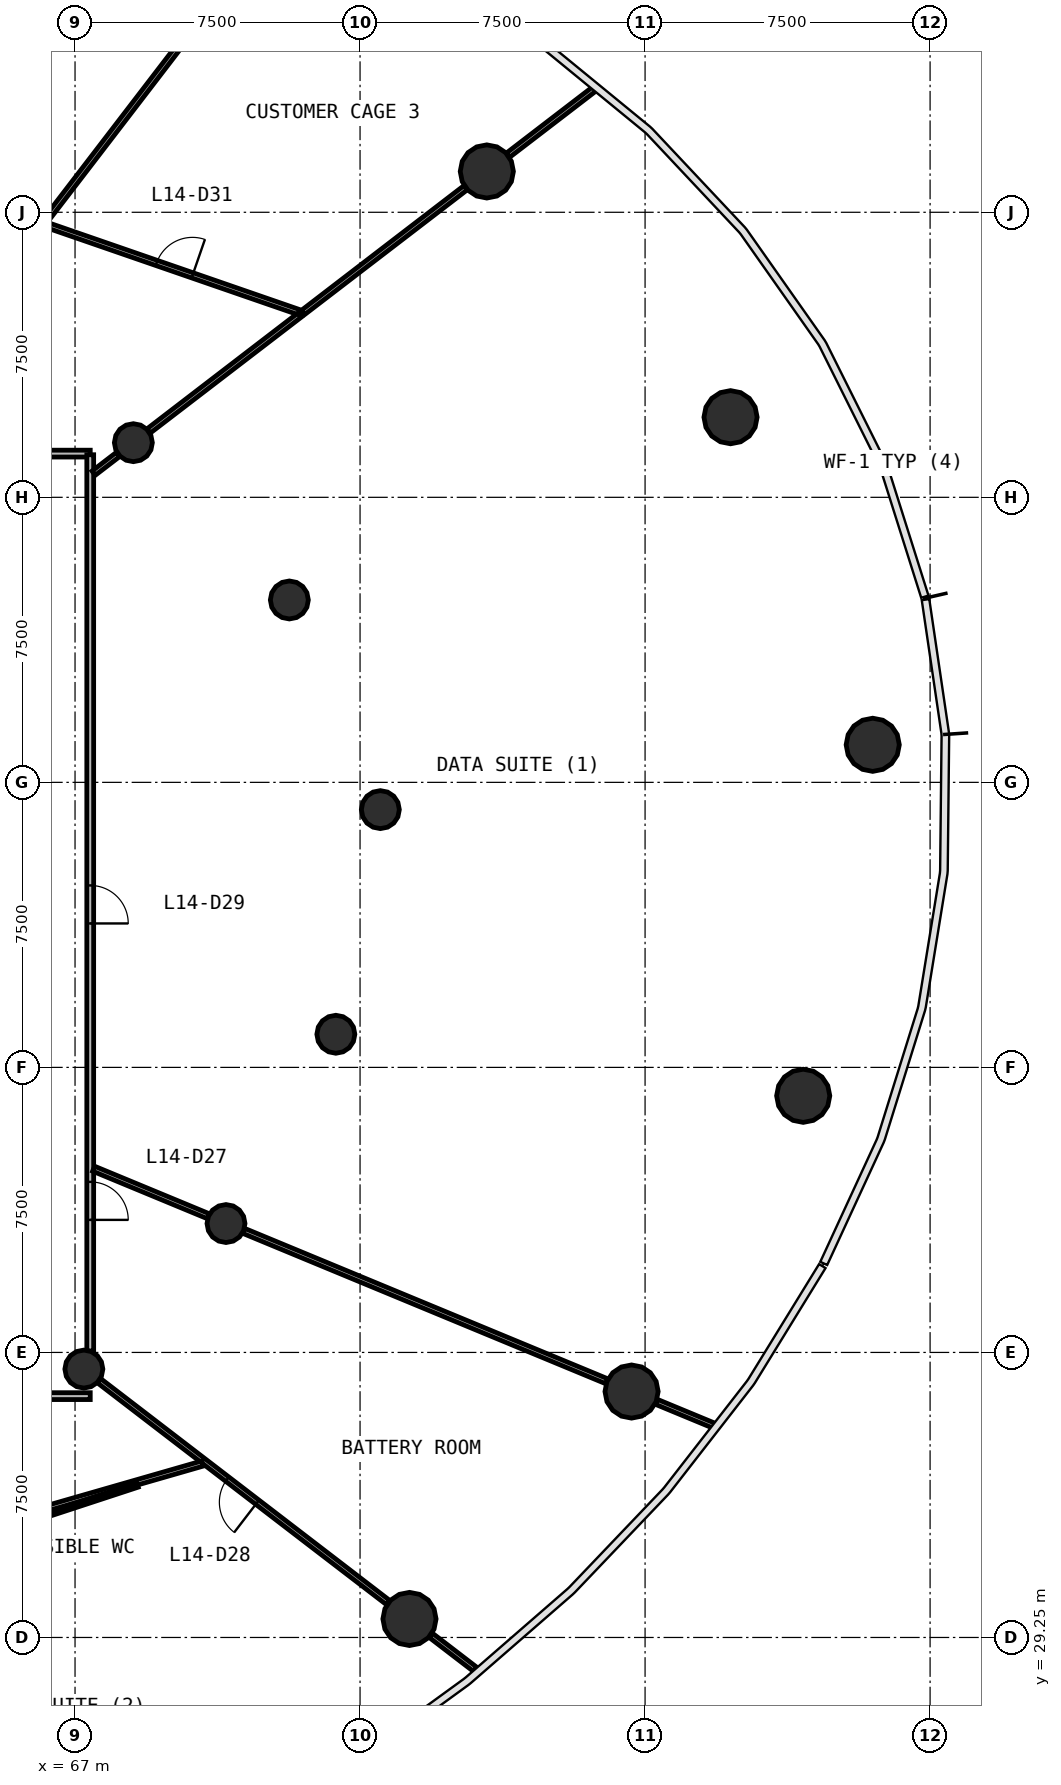
"""IFC4 building model, lengths in metres.
Left out: names, types, materials, properties, quantities, classifications, styles, units other than length and angle.
Written with IfcOpenShell. Run it as: python <this file> out.ifc"""

import sys

from ifc_helpers import new_model, si_unit, direction, frame, frame_2d, origin, origin_2d, place, context, subcontext, project, spatial, rectangle, circle, extrude, source, transform, mapped, element, fill, save


model = new_model("IFC4")
c1 = context("Model", 3, precision=1e-05, world=origin(), true_north=direction((0.0, 1.0)))
c2 = subcontext(c1, "Body", "Model", "MODEL_VIEW")
j1 = project(units=[si_unit("LENGTHUNIT", "METRE"), si_unit("PLANEANGLEUNIT", "RADIAN")], contexts=[c1])
p1 = place(None, origin())
s1 = spatial("IfcSite", under=j1, at=p1, CompositionType="ELEMENT")
p2 = place(p1, origin())
s2 = spatial("IfcBuilding", under=s1, at=p2, CompositionType="ELEMENT")
p3 = place(p2, frame((0.0, 0.0, 62.2)))
s3 = spatial("IfcBuildingStorey", under=s2, at=p3, CompositionType="ELEMENT", Elevation=62.2)
m1 = source(origin(), c2, "Body", "SweptSolid", [
    extrude(circle(Radius=0.7, at=origin_2d()), origin(), (0.0, 0.0, 1.0), 4.4),
])
for number, where, z_axis, x_axis in (
    (1, (87.99, 52.738, 0.0), (0.0, 0.0, 1.0), (1.0, 0.0, 0.0)),
    (2, (84.249, 61.358, 0.0), (0.0, 0.0, 1.0), (1.0, 0.0, 0.0)),
    (3, (77.836, 67.824, 0.0), (0.0, 0.0, 1.0), (1.0, 0.0, 0.0)),
    (4, (75.801, 29.737, 0.0), (0.0, 0.0, 1.0), (1.0, 0.0, 0.0)),
    (5, (81.645, 35.721, 0.0), (0.0, 0.0, 1.0), (1.0, 0.0, 0.0)),
    (6, (86.161, 43.503, 0.0), (0.0, 0.0, 1.0), (1.0, 0.0, 0.0)),
):
    element("IfcColumn", number, at=place(p3, frame(where, z_axis=z_axis, x_axis=x_axis)), inside=s3, PredefinedType="COLUMN", context=c2, shape_type="MappedRepresentation", body=[
        mapped(m1, transform((0.0, 0.0, 0.0), scale=1.0)),
    ])
m2 = source(origin(), c2, "Body", "SweptSolid", [
    extrude(circle(Radius=0.5, at=origin_2d()), origin(), (0.0, 0.0, 1.0), 4.4),
])
for number, where, z_axis, x_axis in (
    (7, (75.034, 51.032, 0.0), (0.0, 0.0, 1.0), (1.0, 0.0, 0.0)),
    (8, (72.639, 56.549, 0.0), (0.0, 0.0, 1.0), (1.0, 0.0, 0.0)),
    (9, (68.535, 60.688, 0.0), (0.0, 0.0, 1.0), (1.0, 0.0, 0.0)),
    (10, (67.232, 36.312, 0.0), (0.0, 0.0, 1.0), (1.0, 0.0, 0.0)),
    (11, (70.972, 40.141, 0.0), (0.0, 0.0, 1.0), (1.0, 0.0, 0.0)),
    (12, (73.863, 45.122, 0.0), (0.0, 0.0, 1.0), (1.0, 0.0, 0.0)),
):
    element("IfcColumn", number, at=place(p3, frame(where, z_axis=z_axis, x_axis=x_axis)), inside=s3, PredefinedType="COLUMN", context=c2, shape_type="MappedRepresentation", body=[
        mapped(m2, transform((0.0, 0.0, 0.0), scale=1.0)),
    ])
p4 = place(p3, frame((67.4, 35.6, 0.0), z_axis=(0.0, 0.0, 1.0), x_axis=(-1.0, 0.0, 0.0)))
e13 = element("IfcWall", 13, at=p4, inside=s3, PredefinedType="PARTITIONING", context=c2, shape_type="SweptSolid", body=[
    extrude(rectangle(XDim=30.8, YDim=0.18, at=frame_2d((15.4, 0.0))), origin(), (0.0, 0.0, 1.0), 3.05),
])
p5 = place(p4, frame((9.05, 0.0, 0.0)))
e14 = element("IfcOpeningElement", 14, at=p5, cuts=e13, PredefinedType="OPENING", context=c2, shape_type="SweptSolid", body=[
    extrude(rectangle(XDim=0.9, YDim=2.1, at=frame_2d((0.45, 1.05))), frame((0.0, 0.1, 0.0), z_axis=(0.0, -1.0, 0.0), x_axis=(1.0, 0.0, 0.0)), (0.0, 0.0, 1.0), 0.2),
])
p6 = place(p4, frame((6.05, 0.0, 0.0)))
e15 = element("IfcOpeningElement", 15, at=p6, cuts=e13, PredefinedType="OPENING", context=c2, shape_type="SweptSolid", body=[
    extrude(rectangle(XDim=0.9, YDim=2.1, at=frame_2d((0.45, 1.05))), frame((0.0, 0.1, 0.0), z_axis=(0.0, -1.0, 0.0), x_axis=(1.0, 0.0, 0.0)), (0.0, 0.0, 1.0), 0.2),
])
p7 = place(p4, frame((2.45, 0.0, 0.0)))
e16 = element("IfcOpeningElement", 16, at=p7, cuts=e13, PredefinedType="OPENING", context=c2, shape_type="SweptSolid", body=[
    extrude(rectangle(XDim=0.9, YDim=2.1, at=frame_2d((0.45, 1.05))), frame((0.0, 0.1, 0.0), z_axis=(0.0, -1.0, 0.0), x_axis=(1.0, 0.0, 0.0)), (0.0, 0.0, 1.0), 0.2),
])
p8 = place(p4, frame((20.95, 0.0, 0.0)))
e17 = element("IfcOpeningElement", 17, at=p8, cuts=e13, PredefinedType="OPENING", context=c2, shape_type="SweptSolid", body=[
    extrude(rectangle(XDim=1.0, YDim=2.1, at=frame_2d((0.5, 1.05))), frame((0.0, 0.1, 0.0), z_axis=(0.0, -1.0, 0.0), x_axis=(1.0, 0.0, 0.0)), (0.0, 0.0, 1.0), 0.2),
])
p9 = place(p4, frame((14.95, 0.0, 0.0)))
e18 = element("IfcOpeningElement", 18, at=p9, cuts=e13, PredefinedType="OPENING", context=c2, shape_type="SweptSolid", body=[
    extrude(rectangle(XDim=1.0, YDim=2.1, at=frame_2d((0.5, 1.05))), frame((0.0, 0.1, 0.0), z_axis=(0.0, -1.0, 0.0), x_axis=(1.0, 0.0, 0.0)), (0.0, 0.0, 1.0), 0.2),
])
p10 = place(p4, frame((12.55, 0.0, 0.0)))
e19 = element("IfcOpeningElement", 19, at=p10, cuts=e13, PredefinedType="OPENING", context=c2, shape_type="SweptSolid", body=[
    extrude(rectangle(XDim=1.0, YDim=2.1, at=frame_2d((0.5, 1.05))), frame((0.0, 0.1, 0.0), z_axis=(0.0, -1.0, 0.0), x_axis=(1.0, 0.0, 0.0)), (0.0, 0.0, 1.0), 0.2),
])
p11 = place(p3, frame((36.6, 60.4, 0.0), z_axis=(0.0, 0.0, 1.0), x_axis=(1.0, 0.0, 0.0)))
e20 = element("IfcWall", 20, at=p11, inside=s3, PredefinedType="PARTITIONING", context=c2, shape_type="SweptSolid", body=[
    extrude(rectangle(XDim=30.8, YDim=0.18, at=frame_2d((15.4, 0.0))), origin(), (0.0, 0.0, 1.0), 3.05),
])
p12 = place(p11, frame((17.35, 0.0, 0.0)))
e21 = element("IfcOpeningElement", 21, at=p12, cuts=e20, PredefinedType="OPENING", context=c2, shape_type="SweptSolid", body=[
    extrude(rectangle(XDim=1.0, YDim=2.1, at=frame_2d((0.5, 1.05))), frame((0.0, 0.1, 0.0), z_axis=(0.0, -1.0, 0.0), x_axis=(1.0, 0.0, 0.0)), (0.0, 0.0, 1.0), 0.2),
])
p13 = place(p11, frame((14.95, 0.0, 0.0)))
e22 = element("IfcOpeningElement", 22, at=p13, cuts=e20, PredefinedType="OPENING", context=c2, shape_type="SweptSolid", body=[
    extrude(rectangle(XDim=1.0, YDim=2.1, at=frame_2d((0.5, 1.05))), frame((0.0, 0.1, 0.0), z_axis=(0.0, -1.0, 0.0), x_axis=(1.0, 0.0, 0.0)), (0.0, 0.0, 1.0), 0.2),
])
p14 = place(p3, frame((67.4, 60.37, 0.0), z_axis=(0.0, 0.0, 1.0), x_axis=(0.0, -1.0, 0.0)))
e23 = element("IfcWall", 23, at=p14, inside=s3, PredefinedType="PARTITIONING", context=c2, shape_type="SweptSolid", body=[
    extrude(rectangle(XDim=23.583, YDim=0.18, at=frame_2d((11.791, 0.0))), origin(), (0.0, 0.0, 1.0), 3.05),
])
p15 = place(p14, frame((19.133, 0.0, 0.0)))
e24 = element("IfcOpeningElement", 24, at=p15, cuts=e23, PredefinedType="OPENING", context=c2, shape_type="SweptSolid", body=[
    extrude(rectangle(XDim=1.0, YDim=2.1, at=frame_2d((0.5, 1.05))), frame((0.0, 0.1, 0.0), z_axis=(0.0, -1.0, 0.0), x_axis=(1.0, 0.0, 0.0)), (0.0, 0.0, 1.0), 0.2),
])
p16 = place(p14, frame((11.333, 0.0, 0.0)))
e25 = element("IfcOpeningElement", 25, at=p16, cuts=e23, PredefinedType="OPENING", context=c2, shape_type="SweptSolid", body=[
    extrude(rectangle(XDim=1.0, YDim=2.1, at=frame_2d((0.5, 1.05))), frame((0.0, 0.1, 0.0), z_axis=(0.0, -1.0, 0.0), x_axis=(1.0, 0.0, 0.0)), (0.0, 0.0, 1.0), 0.2),
])
p17 = place(p3, frame((71.439, 39.948, 0.0), z_axis=(0.0, 0.0, 1.0), x_axis=(0.923874685699, -0.382695133396, 0.0)))
e26 = element("IfcWall", 26, at=p17, inside=s3, PredefinedType="PARTITIONING", context=c2, shape_type="SweptSolid", body=[
    extrude(rectangle(XDim=10.341, YDim=0.14, at=frame_2d((5.17, 0.0))), origin(), (0.0, 0.0, 1.0), 3.05),
])
p18 = place(p3, frame((75.242, 30.166, 0.0), z_axis=(0.0, 0.0, 1.0), x_axis=(-0.793366218398, 0.608744645566, 0.0)))
e27 = element("IfcWall", 27, at=p18, inside=s3, PredefinedType="PARTITIONING", context=c2, shape_type="SweptSolid", body=[
    extrude(rectangle(XDim=9.591, YDim=0.14, at=frame_2d((4.796, 0.0))), origin(), (0.0, 0.0, 1.0), 3.05),
])
p19 = place(p18, frame((4.341, 0.0, 0.0)))
e28 = element("IfcOpeningElement", 28, at=p19, cuts=e27, PredefinedType="OPENING", context=c2, shape_type="SweptSolid", body=[
    extrude(rectangle(XDim=1.0, YDim=2.1, at=frame_2d((0.5, 1.05))), frame((0.0, 0.08, 0.0), z_axis=(0.0, -1.0, 0.0), x_axis=(1.0, 0.0, 0.0)), (0.0, 0.0, 1.0), 0.16),
])
p20 = place(p3, frame((66.157, 66.45, 0.0), z_axis=(0.0, 0.0, 1.0), x_axis=(0.94512845443, -0.326698951064, 0.0)))
e29 = element("IfcWall", 29, at=p20, inside=s3, PredefinedType="PARTITIONING", context=c2, shape_type="SweptSolid", body=[
    extrude(rectangle(XDim=7.212, YDim=0.14, at=frame_2d((3.606, 0.0))), origin(), (0.0, 0.0, 1.0), 3.05),
])
p21 = place(p20, frame((3.162, 0.0, 0.0)))
e30 = element("IfcOpeningElement", 30, at=p21, cuts=e29, PredefinedType="OPENING", context=c2, shape_type="SweptSolid", body=[
    extrude(rectangle(XDim=1.0, YDim=2.1, at=frame_2d((0.5, 1.05))), frame((0.0, 0.08, 0.0), z_axis=(0.0, -1.0, 0.0), x_axis=(1.0, 0.0, 0.0)), (0.0, 0.0, 1.0), 0.16),
])
p22 = place(p3, frame((64.228, 32.064, 0.0), z_axis=(0.0, 0.0, 1.0), x_axis=(0.961015140523, 0.276495749849, 0.0)))
e31 = element("IfcWall", 31, at=p22, inside=s3, PredefinedType="PARTITIONING", context=c2, shape_type="SweptSolid", body=[
    extrude(rectangle(XDim=6.376, YDim=0.14, at=frame_2d((3.188, 0.0))), origin(), (0.0, 0.0, 1.0), 3.05),
])
p23 = place(p3, frame((66.202, 66.508, 0.0), z_axis=(0.0, 0.0, 1.0), x_axis=(0.608769216059, 0.793347365017, 0.0)))
e32 = element("IfcWall", 32, at=p23, inside=s3, PredefinedType="PARTITIONING", context=c2, shape_type="SweptSolid", body=[
    extrude(rectangle(XDim=6.344, YDim=0.14, at=frame_2d((3.172, 0.0))), origin(), (0.0, 0.0, 1.0), 3.05),
])
p24 = place(p3, frame((72.997, 64.112, 0.0), z_axis=(0.0, 0.0, 1.0), x_axis=(0.793363718192, 0.608747904027, 0.0)))
e33 = element("IfcWall", 33, at=p24, inside=s3, PredefinedType="PARTITIONING", context=c2, shape_type="SweptSolid", body=[
    extrude(rectangle(XDim=5.394, YDim=0.14, at=frame_2d((2.697, 0.0))), origin(), (0.0, 0.0, 1.0), 3.05),
])
p25 = place(p3, frame((68.935, 60.995, 0.0), z_axis=(0.0, 0.0, 1.0), x_axis=(0.793344926922, 0.608772393368, 0.0)))
e34 = element("IfcWall", 34, at=p25, inside=s3, PredefinedType="PARTITIONING", context=c2, shape_type="SweptSolid", body=[
    extrude(rectangle(XDim=5.007, YDim=0.14, at=frame_2d((2.503, 0.0))), origin(), (0.0, 0.0, 1.0), 3.05),
])
p26 = place(p3, frame((67.49, 41.584, 0.0), z_axis=(0.0, 0.0, 1.0), x_axis=(0.923911109142, -0.382607190737, 0.0)))
e35 = element("IfcWall", 35, at=p26, inside=s3, PredefinedType="PARTITIONING", context=c2, shape_type="SweptSolid", body=[
    extrude(rectangle(XDim=3.264, YDim=0.14, at=frame_2d((1.632, 0.0))), origin(), (0.0, 0.0, 1.0), 3.05),
])
p27 = place(p3, frame((78.394, 68.253, 0.0), z_axis=(0.0, 0.0, 1.0), x_axis=(0.793354252031, 0.608760240804, 0.0)))
e36 = element("IfcWall", 36, at=p27, inside=s3, PredefinedType="PARTITIONING", context=c2, shape_type="SweptSolid", body=[
    extrude(rectangle(XDim=2.869, YDim=0.14, at=frame_2d((1.434, 0.0))), origin(), (0.0, 0.0, 1.0), 3.05),
])
p28 = place(p3, frame((82.296, 35.451, 0.0), z_axis=(0.0, 0.0, 1.0), x_axis=(0.923875488976, -0.382693194178, 0.0)))
e37 = element("IfcWall", 37, at=p28, inside=s3, PredefinedType="PARTITIONING", context=c2, shape_type="SweptSolid", body=[
    extrude(rectangle(XDim=1.642, YDim=0.14, at=frame_2d((0.821, 0.0))), origin(), (0.0, 0.0, 1.0), 3.05),
])
p29 = place(p3, frame((76.359, 29.309, 0.0), z_axis=(0.0, 0.0, 1.0), x_axis=(0.793275855942, -0.608862395274, 0.0)))
e38 = element("IfcWall", 38, at=p29, inside=s3, PredefinedType="PARTITIONING", context=c2, shape_type="SweptSolid", body=[
    extrude(rectangle(XDim=1.475, YDim=0.14, at=frame_2d((0.737, 0.0))), origin(), (0.0, 0.0, 1.0), 3.05),
])
p30 = place(p3, frame((67.49, 59.886, 0.0), z_axis=(0.0, 0.0, 1.0), x_axis=(0.793316076519, 0.608809989025, 0.0)))
e39 = element("IfcWall", 39, at=p30, inside=s3, PredefinedType="PARTITIONING", context=c2, shape_type="SweptSolid", body=[
    extrude(rectangle(XDim=0.812, YDim=0.14, at=frame_2d((0.406, 0.0))), origin(), (0.0, 0.0, 1.0), 3.05),
])
p31 = place(p3, frame((66.231, 32.47, 0.0), z_axis=(0.0, 0.0, 1.0), x_axis=(0.950105410071, 0.311929013967, 0.0)))
e40 = element("IfcWall", 40, at=p31, inside=s3, PredefinedType="PARTITIONING", context=c2, shape_type="SweptSolid", body=[
    extrude(rectangle(XDim=2.541, YDim=0.12, at=frame_2d((1.27, 0.0))), origin(), (0.0, 0.0, 1.0), 3.05),
])
m3 = source(origin(), c2, "Body", "SweptSolid", [
    extrude(rectangle(XDim=1.0, YDim=2.1, at=frame_2d((0.5, 1.05))), frame((0.0, 0.025, 0.0), z_axis=(0.0, -1.0, 0.0), x_axis=(1.0, 0.0, 0.0)), (0.0, 0.0, 1.0), 0.05),
])
p32 = place(p15, origin())
e41 = element("IfcDoor", 41, at=p32, inside=s3, OperationType="SINGLE_SWING_RIGHT", PredefinedType="DOOR", context=c2, shape_type="MappedRepresentation", body=[
    mapped(m3, transform((0.0, 0.0, 0.0), scale=1.0)),
])
fill(e24, e41)
p33 = place(p19, origin())
e42 = element("IfcDoor", 42, at=p33, inside=s3, OperationType="SINGLE_SWING_LEFT", PredefinedType="DOOR", context=c2, shape_type="MappedRepresentation", body=[
    mapped(m3, transform((0.0, 0.0, 0.0), scale=1.0)),
])
fill(e28, e42)
p34 = place(p16, origin())
e43 = element("IfcDoor", 43, at=p34, inside=s3, OperationType="SINGLE_SWING_RIGHT", PredefinedType="DOOR", context=c2, shape_type="MappedRepresentation", body=[
    mapped(m3, transform((0.0, 0.0, 0.0), scale=1.0)),
])
fill(e25, e43)
p35 = place(p21, origin())
e44 = element("IfcDoor", 44, at=p35, inside=s3, OperationType="SINGLE_SWING_RIGHT", PredefinedType="DOOR", context=c2, shape_type="MappedRepresentation", body=[
    mapped(m3, transform((0.0, 0.0, 0.0), scale=1.0)),
])
fill(e30, e44)
save(model, sys.argv[1])
